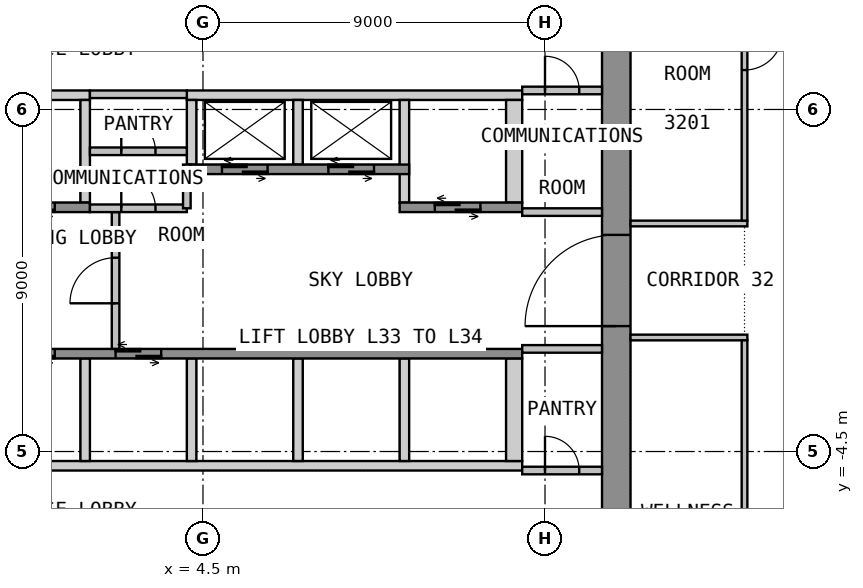
"""IFC4 building model, lengths in metres.
Left out: names, types, materials, properties, quantities, classifications, styles, units other than length and angle.
Written with IfcOpenShell. Run it as: python <this file> out.ifc"""

import sys

from ifc_helpers import new_model, si_unit, direction, frame, frame_2d, origin, place, context, subcontext, project, spatial, polyline, rectangle, outline, extrude, element, fill, save


model = new_model("IFC4")
c1 = context("Model", 3, precision=1e-05, world=origin(), true_north=direction((0.0, 1.0)))
c2 = subcontext(c1, "Body", "Model", "MODEL_VIEW")
j1 = project(units=[si_unit("LENGTHUNIT", "METRE"), si_unit("PLANEANGLEUNIT", "RADIAN")], contexts=[c1])
p1 = place(None, origin())
s1 = spatial("IfcSite", under=j1, at=p1, CompositionType="ELEMENT")
p2 = place(p1, origin())
s2 = spatial("IfcBuilding", under=s1, at=p2, CompositionType="ELEMENT")
p3 = place(p2, frame((0.0, 0.0, 132.6)))
s3 = spatial("IfcBuildingStorey", under=s2, at=p3, CompositionType="ELEMENT", Elevation=132.6)
p4 = place(p3, frame((15.375, -12.75, 0.0), z_axis=(0.0, 0.0, 1.0), x_axis=(0.0, 1.0, 0.0)))
e1 = element("IfcWall", 1, at=p4, inside=s3, PredefinedType="SHEAR", context=c2, shape_type="SweptSolid", body=[
    extrude(rectangle(XDim=25.5, YDim=0.75, at=frame_2d((12.75, 0.0))), origin(), (0.0, 0.0, 1.0), 3.575),
])
p5 = place(p4, frame((11.55, 0.0, 0.0)))
e2 = element("IfcOpeningElement", 2, at=p5, cuts=e1, PredefinedType="OPENING", context=c2, shape_type="SweptSolid", body=[
    extrude(rectangle(XDim=2.4, YDim=2.1, at=frame_2d((1.2, 1.05))), frame((0.0, 0.385, 0.0), z_axis=(0.0, -1.0, 0.0), x_axis=(1.0, 0.0, 0.0)), (0.0, 0.0, 1.0), 0.77),
])
p6 = place(p3, origin())
e3 = element("IfcWall", 3, at=p6, inside=s3, PredefinedType="SHEAR", context=c2, shape_type="SweptSolid", body=[
    extrude(outline(polyline([(-1.525, 4.75), (1.525, 4.75), (1.525, 5.0), (-1.525, 5.0), (-1.525, 4.75)])), origin(), (0.0, 0.0, 1.0), 3.575),
])
p7 = place(p3, origin())
e4 = element("IfcWall", 4, at=p7, inside=s3, PredefinedType="SHEAR", context=c2, shape_type="SweptSolid", body=[
    extrude(outline(polyline([(4.075, 4.75), (12.9, 4.75), (12.9, 5.0), (4.075, 5.0), (4.075, 4.75)])), origin(), (0.0, 0.0, 1.0), 3.575),
])
p8 = place(p3, origin())
e5 = element("IfcWall", 5, at=p8, inside=s3, PredefinedType="SHEAR", context=c2, shape_type="SweptSolid", body=[
    extrude(outline(polyline([(1.275, 2.05), (1.525, 2.05), (1.525, 4.75), (1.275, 4.75), (1.275, 2.05)])), origin(), (0.0, 0.0, 1.0), 3.575),
])
p9 = place(p3, origin())
e6 = element("IfcWall", 6, at=p9, inside=s3, PredefinedType="SHEAR", context=c2, shape_type="SweptSolid", body=[
    extrude(outline(polyline([(9.675, 2.05), (9.925, 2.05), (9.925, 4.75), (9.675, 4.75), (9.675, 2.05)])), origin(), (0.0, 0.0, 1.0), 3.575),
])
p10 = place(p3, origin())
e7 = element("IfcWall", 7, at=p10, inside=s3, PredefinedType="SHEAR", context=c2, shape_type="SweptSolid", body=[
    extrude(outline(polyline([(12.475, 2.05), (12.9, 2.05), (12.9, 4.75), (12.475, 4.75), (12.475, 2.05)])), origin(), (0.0, 0.0, 1.0), 3.575),
])
p11 = place(p3, origin())
e8 = element("IfcWall", 8, at=p11, inside=s3, PredefinedType="SHEAR", context=c2, shape_type="SweptSolid", body=[
    extrude(outline(polyline([(4.075, 3.05), (4.325, 3.05), (4.325, 4.75), (4.075, 4.75), (4.075, 3.05)])), origin(), (0.0, 0.0, 1.0), 3.575),
])
p12 = place(p3, origin())
e9 = element("IfcWall", 9, at=p12, inside=s3, PredefinedType="SHEAR", context=c2, shape_type="SweptSolid", body=[
    extrude(outline(polyline([(6.875, 3.05), (7.125, 3.05), (7.125, 4.75), (6.875, 4.75), (6.875, 3.05)])), origin(), (0.0, 0.0, 1.0), 3.575),
])
p13 = place(p3, frame((-1.525, 1.925, 0.0), z_axis=(0.0, 0.0, 1.0), x_axis=(1.0, 0.0, 0.0)))
e10 = element("IfcWall", 10, at=p13, inside=s3, PredefinedType="SHEAR", context=c2, shape_type="SweptSolid", body=[
    extrude(rectangle(XDim=3.05, YDim=0.25, at=frame_2d((1.525, 0.0))), origin(), (0.0, 0.0, 1.0), 3.575),
])
p14 = place(p13, frame((0.925, 0.0, 0.0)))
e11 = element("IfcOpeningElement", 11, at=p14, cuts=e10, PredefinedType="OPENING", context=c2, shape_type="SweptSolid", body=[
    extrude(rectangle(XDim=1.2, YDim=2.1, at=frame_2d((0.6, 1.05))), frame((0.0, 0.135, 0.0), z_axis=(0.0, -1.0, 0.0), x_axis=(1.0, 0.0, 0.0)), (0.0, 0.0, 1.0), 0.27),
])
p15 = place(p3, frame((4.075, 2.925, 0.0), z_axis=(0.0, 0.0, 1.0), x_axis=(1.0, 0.0, 0.0)))
e12 = element("IfcWall", 12, at=p15, inside=s3, PredefinedType="SHEAR", context=c2, shape_type="SweptSolid", body=[
    extrude(rectangle(XDim=5.85, YDim=0.25, at=frame_2d((2.925, 0.0))), origin(), (0.0, 0.0, 1.0), 3.575),
])
p16 = place(p15, frame((0.925, 0.0, 0.0)))
e13 = element("IfcOpeningElement", 13, at=p16, cuts=e12, PredefinedType="OPENING", context=c2, shape_type="SweptSolid", body=[
    extrude(rectangle(XDim=1.2, YDim=2.1, at=frame_2d((0.6, 1.05))), frame((0.0, 0.135, 0.0), z_axis=(0.0, -1.0, 0.0), x_axis=(1.0, 0.0, 0.0)), (0.0, 0.0, 1.0), 0.27),
])
p17 = place(p15, frame((3.725, 0.0, 0.0)))
e14 = element("IfcOpeningElement", 14, at=p17, cuts=e12, PredefinedType="OPENING", context=c2, shape_type="SweptSolid", body=[
    extrude(rectangle(XDim=1.2, YDim=2.1, at=frame_2d((0.6, 1.05))), frame((0.0, 0.135, 0.0), z_axis=(0.0, -1.0, 0.0), x_axis=(1.0, 0.0, 0.0)), (0.0, 0.0, 1.0), 0.27),
])
p18 = place(p3, frame((9.675, 1.925, 0.0), z_axis=(0.0, 0.0, 1.0), x_axis=(1.0, 0.0, 0.0)))
e15 = element("IfcWall", 15, at=p18, inside=s3, PredefinedType="SHEAR", context=c2, shape_type="SweptSolid", body=[
    extrude(rectangle(XDim=3.225, YDim=0.25, at=frame_2d((1.612, 0.0))), origin(), (0.0, 0.0, 1.0), 3.575),
])
p19 = place(p18, frame((0.925, 0.0, 0.0)))
e16 = element("IfcOpeningElement", 16, at=p19, cuts=e15, PredefinedType="OPENING", context=c2, shape_type="SweptSolid", body=[
    extrude(rectangle(XDim=1.2, YDim=2.1, at=frame_2d((0.6, 1.05))), frame((0.0, 0.135, 0.0), z_axis=(0.0, -1.0, 0.0), x_axis=(1.0, 0.0, 0.0)), (0.0, 0.0, 1.0), 0.27),
])
p20 = place(p3, origin())
e17 = element("IfcWall", 17, at=p20, inside=s3, PredefinedType="SHEAR", context=c2, shape_type="SweptSolid", body=[
    extrude(outline(polyline([(-1.525, -5.0), (12.9, -5.0), (12.9, -4.75), (-1.525, -4.75), (-1.525, -5.0)])), origin(), (0.0, 0.0, 1.0), 3.575),
])
p21 = place(p3, origin())
e18 = element("IfcWall", 18, at=p21, inside=s3, PredefinedType="SHEAR", context=c2, shape_type="SweptSolid", body=[
    extrude(outline(polyline([(1.275, -4.75), (1.525, -4.75), (1.525, -2.05), (1.275, -2.05), (1.275, -4.75)])), origin(), (0.0, 0.0, 1.0), 3.575),
])
p22 = place(p3, origin())
e19 = element("IfcWall", 19, at=p22, inside=s3, PredefinedType="SHEAR", context=c2, shape_type="SweptSolid", body=[
    extrude(outline(polyline([(4.075, -4.75), (4.325, -4.75), (4.325, -2.05), (4.075, -2.05), (4.075, -4.75)])), origin(), (0.0, 0.0, 1.0), 3.575),
])
p23 = place(p3, origin())
e20 = element("IfcWall", 20, at=p23, inside=s3, PredefinedType="SHEAR", context=c2, shape_type="SweptSolid", body=[
    extrude(outline(polyline([(6.875, -4.75), (7.125, -4.75), (7.125, -2.05), (6.875, -2.05), (6.875, -4.75)])), origin(), (0.0, 0.0, 1.0), 3.575),
])
p24 = place(p3, origin())
e21 = element("IfcWall", 21, at=p24, inside=s3, PredefinedType="SHEAR", context=c2, shape_type="SweptSolid", body=[
    extrude(outline(polyline([(9.675, -4.75), (9.925, -4.75), (9.925, -2.05), (9.675, -2.05), (9.675, -4.75)])), origin(), (0.0, 0.0, 1.0), 3.575),
])
p25 = place(p3, origin())
e22 = element("IfcWall", 22, at=p25, inside=s3, PredefinedType="SHEAR", context=c2, shape_type="SweptSolid", body=[
    extrude(outline(polyline([(12.475, -4.75), (12.9, -4.75), (12.9, -2.05), (12.475, -2.05), (12.475, -4.75)])), origin(), (0.0, 0.0, 1.0), 3.575),
])
p26 = place(p3, frame((-1.525, -1.925, 0.0), z_axis=(0.0, 0.0, 1.0), x_axis=(1.0, 0.0, 0.0)))
e23 = element("IfcWall", 23, at=p26, inside=s3, PredefinedType="SHEAR", context=c2, shape_type="SweptSolid", body=[
    extrude(rectangle(XDim=14.425, YDim=0.25, at=frame_2d((7.212, 0.0))), origin(), (0.0, 0.0, 1.0), 3.575),
])
p27 = place(p26, frame((0.925, 0.0, 0.0)))
e24 = element("IfcOpeningElement", 24, at=p27, cuts=e23, PredefinedType="OPENING", context=c2, shape_type="SweptSolid", body=[
    extrude(rectangle(XDim=1.2, YDim=2.1, at=frame_2d((0.6, 1.05))), frame((0.0, 0.135, 0.0), z_axis=(0.0, -1.0, 0.0), x_axis=(1.0, 0.0, 0.0)), (0.0, 0.0, 1.0), 0.27),
])
p28 = place(p26, frame((3.725, 0.0, 0.0)))
e25 = element("IfcOpeningElement", 25, at=p28, cuts=e23, PredefinedType="OPENING", context=c2, shape_type="SweptSolid", body=[
    extrude(rectangle(XDim=1.2, YDim=2.1, at=frame_2d((0.6, 1.05))), frame((0.0, 0.135, 0.0), z_axis=(0.0, -1.0, 0.0), x_axis=(1.0, 0.0, 0.0)), (0.0, 0.0, 1.0), 0.27),
])
p29 = place(p3, frame((2.2, -1.8, 0.0), z_axis=(0.0, 0.0, 1.0), x_axis=(0.0, 1.0, 0.0)))
e26 = element("IfcWall", 26, at=p29, inside=s3, PredefinedType="PARTITIONING", context=c2, shape_type="SweptSolid", body=[
    extrude(rectangle(XDim=3.6, YDim=0.2, at=frame_2d((1.8, 0.0))), origin(), (0.0, 0.0, 1.0), 3.575),
])
p30 = place(p29, frame((1.2, 0.0, 0.0)))
e27 = element("IfcOpeningElement", 27, at=p30, cuts=e26, PredefinedType="OPENING", context=c2, shape_type="SweptSolid", body=[
    extrude(rectangle(XDim=1.2, YDim=2.1, at=frame_2d((0.6, 1.05))), frame((0.0, 0.11, 0.0), z_axis=(0.0, -1.0, 0.0), x_axis=(1.0, 0.0, 0.0)), (0.0, 0.0, 1.0), 0.22),
])
p31 = place(p3, frame((12.9, 5.0, 0.0), z_axis=(0.0, 0.0, 1.0), x_axis=(1.0, 0.0, 0.0)))
e28 = element("IfcWall", 28, at=p31, inside=s3, PredefinedType="PARTITIONING", context=c2, shape_type="SweptSolid", body=[
    extrude(rectangle(XDim=2.1, YDim=0.2, at=frame_2d((1.05, 0.0))), origin(), (0.0, 0.0, 1.0), 3.575),
])
p32 = place(p31, frame((0.6, 0.0, 0.0)))
e29 = element("IfcOpeningElement", 29, at=p32, cuts=e28, PredefinedType="OPENING", context=c2, shape_type="SweptSolid", body=[
    extrude(rectangle(XDim=0.9, YDim=2.1, at=frame_2d((0.45, 1.05))), frame((0.0, 0.11, 0.0), z_axis=(0.0, -1.0, 0.0), x_axis=(1.0, 0.0, 0.0)), (0.0, 0.0, 1.0), 0.22),
])
p33 = place(p3, frame((12.9, 1.8, 0.0), z_axis=(0.0, 0.0, 1.0), x_axis=(1.0, 0.0, 0.0)))
e30 = element("IfcWall", 30, at=p33, inside=s3, PredefinedType="PARTITIONING", context=c2, shape_type="SweptSolid", body=[
    extrude(rectangle(XDim=2.1, YDim=0.2, at=frame_2d((1.05, 0.0))), origin(), (0.0, 0.0, 1.0), 3.575),
])
p34 = place(p3, frame((12.9, -5.0, 0.0), z_axis=(0.0, 0.0, 1.0), x_axis=(1.0, 0.0, 0.0)))
e31 = element("IfcWall", 31, at=p34, inside=s3, PredefinedType="PARTITIONING", context=c2, shape_type="SweptSolid", body=[
    extrude(rectangle(XDim=2.1, YDim=0.2, at=frame_2d((1.05, 0.0))), origin(), (0.0, 0.0, 1.0), 3.575),
])
p35 = place(p34, frame((0.6, 0.0, 0.0)))
e32 = element("IfcOpeningElement", 32, at=p35, cuts=e31, PredefinedType="OPENING", context=c2, shape_type="SweptSolid", body=[
    extrude(rectangle(XDim=0.9, YDim=2.1, at=frame_2d((0.45, 1.05))), frame((0.0, 0.11, 0.0), z_axis=(0.0, -1.0, 0.0), x_axis=(1.0, 0.0, 0.0)), (0.0, 0.0, 1.0), 0.22),
])
p36 = place(p3, frame((12.9, -1.8, 0.0), z_axis=(0.0, 0.0, 1.0), x_axis=(1.0, 0.0, 0.0)))
e33 = element("IfcWall", 33, at=p36, inside=s3, PredefinedType="PARTITIONING", context=c2, shape_type="SweptSolid", body=[
    extrude(rectangle(XDim=2.1, YDim=0.2, at=frame_2d((1.05, 0.0))), origin(), (0.0, 0.0, 1.0), 3.575),
])
p37 = place(p3, frame((1.525, 3.4, 0.0), z_axis=(0.0, 0.0, 1.0), x_axis=(1.0, 0.0, 0.0)))
e34 = element("IfcWall", 34, at=p37, inside=s3, PredefinedType="PARTITIONING", context=c2, shape_type="SweptSolid", body=[
    extrude(rectangle(XDim=2.55, YDim=0.2, at=frame_2d((1.275, 0.0))), origin(), (0.0, 0.0, 1.0), 3.575),
])
p38 = place(p37, frame((0.825, 0.0, 0.0)))
e35 = element("IfcOpeningElement", 35, at=p38, cuts=e34, PredefinedType="OPENING", context=c2, shape_type="SweptSolid", body=[
    extrude(rectangle(XDim=0.9, YDim=2.1, at=frame_2d((0.45, 1.05))), frame((0.0, 0.11, 0.0), z_axis=(0.0, -1.0, 0.0), x_axis=(1.0, 0.0, 0.0)), (0.0, 0.0, 1.0), 0.22),
])
p39 = place(p3, frame((1.525, 1.9, 0.0), z_axis=(0.0, 0.0, 1.0), x_axis=(1.0, 0.0, 0.0)))
e36 = element("IfcWall", 36, at=p39, inside=s3, PredefinedType="PARTITIONING", context=c2, shape_type="SweptSolid", body=[
    extrude(rectangle(XDim=2.55, YDim=0.2, at=frame_2d((1.275, 0.0))), origin(), (0.0, 0.0, 1.0), 3.575),
])
p40 = place(p39, frame((0.825, 0.0, 0.0)))
e37 = element("IfcOpeningElement", 37, at=p40, cuts=e36, PredefinedType="OPENING", context=c2, shape_type="SweptSolid", body=[
    extrude(rectangle(XDim=0.9, YDim=2.1, at=frame_2d((0.45, 1.05))), frame((0.0, 0.11, 0.0), z_axis=(0.0, -1.0, 0.0), x_axis=(1.0, 0.0, 0.0)), (0.0, 0.0, 1.0), 0.22),
])
p41 = place(p3, frame((1.525, 4.9, 0.0), z_axis=(0.0, 0.0, 1.0), x_axis=(1.0, 0.0, 0.0)))
e38 = element("IfcWall", 38, at=p41, inside=s3, PredefinedType="PARTITIONING", context=c2, shape_type="SweptSolid", body=[
    extrude(rectangle(XDim=2.55, YDim=0.2, at=frame_2d((1.275, 0.0))), origin(), (0.0, 0.0, 1.0), 3.575),
])
p42 = place(p3, frame((4.075, 1.9, 0.0), z_axis=(0.0, 0.0, 1.0), x_axis=(0.0, 1.0, 0.0)))
e39 = element("IfcWall", 39, at=p42, inside=s3, PredefinedType="PARTITIONING", context=c2, shape_type="SweptSolid", body=[
    extrude(rectangle(XDim=1.15, YDim=0.2, at=frame_2d((0.575, 0.0))), origin(), (0.0, 0.0, 1.0), 3.575),
])
for number, where, z_axis, x_axis in (
    (40, (15.75, -1.5, 0.0), (0.0, 0.0, 1.0), (1.0, 0.0, 0.0)),
    (41, (18.825, 1.5, 0.0), (0.0, 0.0, 1.0), (-1.0, 0.0, 0.0)),
):
    element("IfcWall", number, at=place(p3, frame(where, z_axis=z_axis, x_axis=x_axis)), inside=s3, PredefinedType="PARTITIONING", context=c2, shape_type="SweptSolid", body=[
        extrude(rectangle(XDim=3.075, YDim=0.15, at=frame_2d((1.538, 0.0))), origin(), (0.0, 0.0, 1.0), 3.575),
    ])
p43 = place(p3, frame((18.75, -1.575, 0.0), z_axis=(0.0, 0.0, 1.0), x_axis=(0.0, -1.0, 0.0)))
e42 = element("IfcWall", 42, at=p43, inside=s3, PredefinedType="PARTITIONING", context=c2, shape_type="SweptSolid", body=[
    extrude(rectangle(XDim=11.925, YDim=0.15, at=frame_2d((5.962, 0.0))), origin(), (0.0, 0.0, 1.0), 3.575),
])
p44 = place(p43, frame((5.462, 0.0, 0.0)))
e43 = element("IfcOpeningElement", 43, at=p44, cuts=e42, PredefinedType="OPENING", context=c2, shape_type="SweptSolid", body=[
    extrude(rectangle(XDim=1.0, YDim=2.1, at=frame_2d((0.5, 1.05))), frame((0.0, 0.085, 0.0), z_axis=(0.0, -1.0, 0.0), x_axis=(1.0, 0.0, 0.0)), (0.0, 0.0, 1.0), 0.17),
])
p45 = place(p3, frame((18.75, 10.5, 0.0), z_axis=(0.0, 0.0, 1.0), x_axis=(0.0, -1.0, 0.0)))
e44 = element("IfcWall", 44, at=p45, inside=s3, PredefinedType="PARTITIONING", context=c2, shape_type="SweptSolid", body=[
    extrude(rectangle(XDim=8.925, YDim=0.15, at=frame_2d((4.462, 0.0))), origin(), (0.0, 0.0, 1.0), 3.575),
])
p46 = place(p45, frame((3.962, 0.0, 0.0)))
e45 = element("IfcOpeningElement", 45, at=p46, cuts=e44, PredefinedType="OPENING", context=c2, shape_type="SweptSolid", body=[
    extrude(rectangle(XDim=1.0, YDim=2.1, at=frame_2d((0.5, 1.05))), frame((0.0, 0.085, 0.0), z_axis=(0.0, -1.0, 0.0), x_axis=(1.0, 0.0, 0.0)), (0.0, 0.0, 1.0), 0.17),
])
p47 = place(p5, origin())
e46 = element("IfcDoor", 46, at=p47, inside=s3, OperationType="DOUBLE_DOOR_DOUBLE_SWING", PredefinedType="DOOR", context=c2, shape_type="SweptSolid", body=[
    extrude(rectangle(XDim=2.4, YDim=2.1, at=frame_2d((1.2, 1.05))), frame((0.0, 0.025, 0.0), z_axis=(0.0, -1.0, 0.0), x_axis=(1.0, 0.0, 0.0)), (0.0, 0.0, 1.0), 0.05),
])
fill(e2, e46)
p48 = place(p14, origin())
e47 = element("IfcDoor", 47, at=p48, inside=s3, OperationType="DOUBLE_DOOR_SLIDING", PredefinedType="DOOR", context=c2, shape_type="SweptSolid", body=[
    extrude(rectangle(XDim=1.2, YDim=2.1, at=frame_2d((0.6, 1.05))), frame((0.0, 0.025, 0.0), z_axis=(0.0, -1.0, 0.0), x_axis=(1.0, 0.0, 0.0)), (0.0, 0.0, 1.0), 0.05),
])
fill(e11, e47)
p49 = place(p16, origin())
e48 = element("IfcDoor", 48, at=p49, inside=s3, OperationType="DOUBLE_DOOR_SLIDING", PredefinedType="DOOR", context=c2, shape_type="SweptSolid", body=[
    extrude(rectangle(XDim=1.2, YDim=2.1, at=frame_2d((0.6, 1.05))), frame((0.0, 0.025, 0.0), z_axis=(0.0, -1.0, 0.0), x_axis=(1.0, 0.0, 0.0)), (0.0, 0.0, 1.0), 0.05),
])
fill(e13, e48)
p50 = place(p17, origin())
e49 = element("IfcDoor", 49, at=p50, inside=s3, OperationType="DOUBLE_DOOR_SLIDING", PredefinedType="DOOR", context=c2, shape_type="SweptSolid", body=[
    extrude(rectangle(XDim=1.2, YDim=2.1, at=frame_2d((0.6, 1.05))), frame((0.0, 0.025, 0.0), z_axis=(0.0, -1.0, 0.0), x_axis=(1.0, 0.0, 0.0)), (0.0, 0.0, 1.0), 0.05),
])
fill(e14, e49)
p51 = place(p19, origin())
e50 = element("IfcDoor", 50, at=p51, inside=s3, OperationType="DOUBLE_DOOR_SLIDING", PredefinedType="DOOR", context=c2, shape_type="SweptSolid", body=[
    extrude(rectangle(XDim=1.2, YDim=2.1, at=frame_2d((0.6, 1.05))), frame((0.0, 0.025, 0.0), z_axis=(0.0, -1.0, 0.0), x_axis=(1.0, 0.0, 0.0)), (0.0, 0.0, 1.0), 0.05),
])
fill(e16, e50)
p52 = place(p27, origin())
e51 = element("IfcDoor", 51, at=p52, inside=s3, OperationType="DOUBLE_DOOR_SLIDING", PredefinedType="DOOR", context=c2, shape_type="SweptSolid", body=[
    extrude(rectangle(XDim=1.2, YDim=2.1, at=frame_2d((0.6, 1.05))), frame((0.0, 0.025, 0.0), z_axis=(0.0, -1.0, 0.0), x_axis=(1.0, 0.0, 0.0)), (0.0, 0.0, 1.0), 0.05),
])
fill(e24, e51)
p53 = place(p28, origin())
e52 = element("IfcDoor", 52, at=p53, inside=s3, OperationType="DOUBLE_DOOR_SLIDING", PredefinedType="DOOR", context=c2, shape_type="SweptSolid", body=[
    extrude(rectangle(XDim=1.2, YDim=2.1, at=frame_2d((0.6, 1.05))), frame((0.0, 0.025, 0.0), z_axis=(0.0, -1.0, 0.0), x_axis=(1.0, 0.0, 0.0)), (0.0, 0.0, 1.0), 0.05),
])
fill(e25, e52)
p54 = place(p30, origin())
e53 = element("IfcDoor", 53, at=p54, inside=s3, OperationType="SINGLE_SWING_LEFT", PredefinedType="DOOR", context=c2, shape_type="SweptSolid", body=[
    extrude(rectangle(XDim=1.2, YDim=2.1, at=frame_2d((0.6, 1.05))), frame((0.0, 0.025, 0.0), z_axis=(0.0, -1.0, 0.0), x_axis=(1.0, 0.0, 0.0)), (0.0, 0.0, 1.0), 0.05),
])
fill(e27, e53)
p55 = place(p32, origin())
e54 = element("IfcDoor", 54, at=p55, inside=s3, OperationType="SINGLE_SWING_LEFT", PredefinedType="DOOR", context=c2, shape_type="SweptSolid", body=[
    extrude(rectangle(XDim=0.9, YDim=2.1, at=frame_2d((0.45, 1.05))), frame((0.0, 0.025, 0.0), z_axis=(0.0, -1.0, 0.0), x_axis=(1.0, 0.0, 0.0)), (0.0, 0.0, 1.0), 0.05),
])
fill(e29, e54)
p56 = place(p35, origin())
e55 = element("IfcDoor", 55, at=p56, inside=s3, OperationType="SINGLE_SWING_LEFT", PredefinedType="DOOR", context=c2, shape_type="SweptSolid", body=[
    extrude(rectangle(XDim=0.9, YDim=2.1, at=frame_2d((0.45, 1.05))), frame((0.0, 0.025, 0.0), z_axis=(0.0, -1.0, 0.0), x_axis=(1.0, 0.0, 0.0)), (0.0, 0.0, 1.0), 0.05),
])
fill(e32, e55)
p57 = place(p38, origin())
e56 = element("IfcDoor", 56, at=p57, inside=s3, OperationType="SINGLE_SWING_LEFT", PredefinedType="DOOR", context=c2, shape_type="SweptSolid", body=[
    extrude(rectangle(XDim=0.9, YDim=2.1, at=frame_2d((0.45, 1.05))), frame((0.0, 0.025, 0.0), z_axis=(0.0, -1.0, 0.0), x_axis=(1.0, 0.0, 0.0)), (0.0, 0.0, 1.0), 0.05),
])
fill(e35, e56)
p58 = place(p40, origin())
e57 = element("IfcDoor", 57, at=p58, inside=s3, OperationType="SINGLE_SWING_LEFT", PredefinedType="DOOR", context=c2, shape_type="SweptSolid", body=[
    extrude(rectangle(XDim=0.9, YDim=2.1, at=frame_2d((0.45, 1.05))), frame((0.0, 0.025, 0.0), z_axis=(0.0, -1.0, 0.0), x_axis=(1.0, 0.0, 0.0)), (0.0, 0.0, 1.0), 0.05),
])
fill(e37, e57)
p59 = place(p46, origin())
e58 = element("IfcDoor", 58, at=p59, inside=s3, OperationType="SINGLE_SWING_RIGHT", PredefinedType="DOOR", context=c2, shape_type="SweptSolid", body=[
    extrude(rectangle(XDim=1.0, YDim=2.1, at=frame_2d((0.5, 1.05))), frame((0.0, 0.025, 0.0), z_axis=(0.0, -1.0, 0.0), x_axis=(1.0, 0.0, 0.0)), (0.0, 0.0, 1.0), 0.05),
])
fill(e45, e58)
save(model, sys.argv[1])
